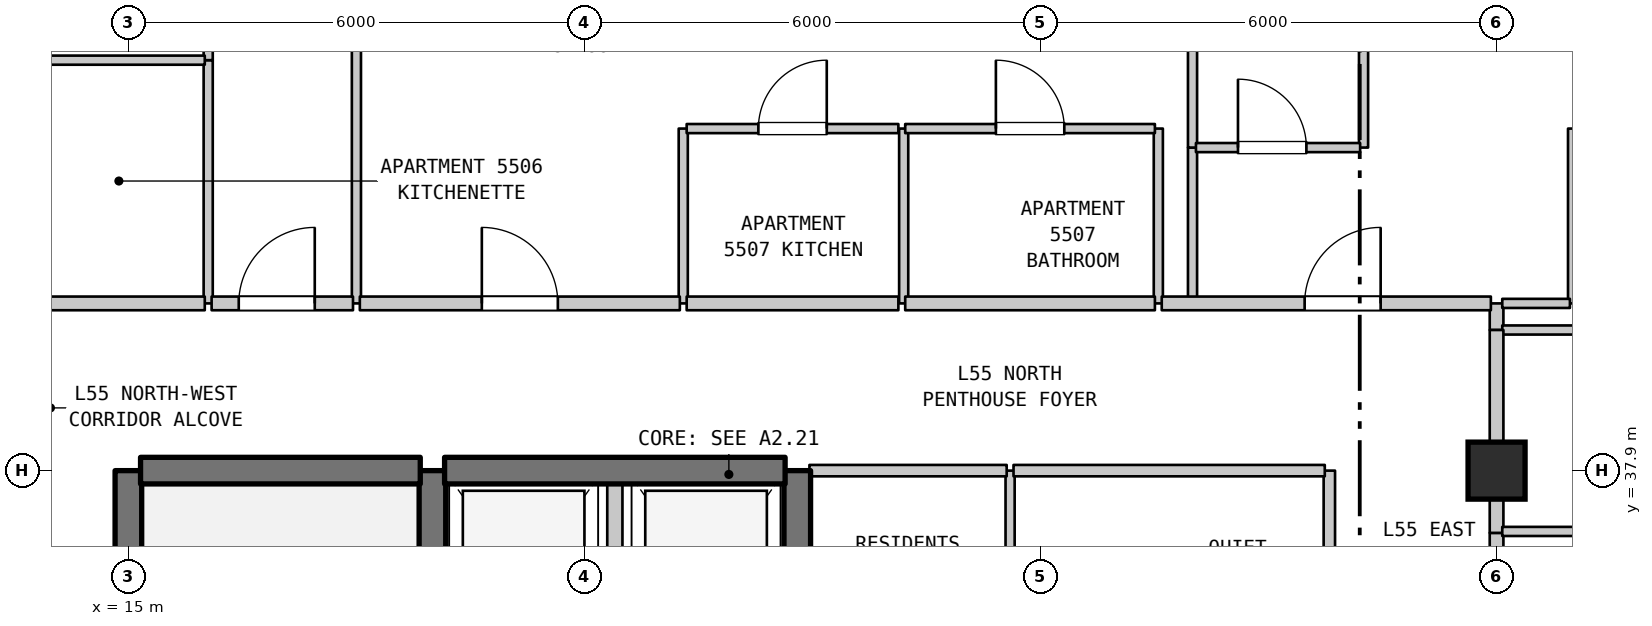
"""IFC4 building model, lengths in metres.
Left out: names, types, materials, properties, quantities, classifications, styles, units other than length and angle.
Written with IfcOpenShell. Run it as: python <this file> out.ifc"""

import sys

from ifc_helpers import new_model, si_unit, direction, frame, frame_2d, origin, origin_2d, place, context, subcontext, project, spatial, rectangle, extrude, element, fill, save


model = new_model("IFC4")
c1 = context("Model", 3, precision=1e-05, world=origin(), true_north=direction((0.0, 1.0)))
c2 = subcontext(c1, "Body", "Model", "MODEL_VIEW")
j1 = project(units=[si_unit("LENGTHUNIT", "METRE"), si_unit("PLANEANGLEUNIT", "RADIAN")], contexts=[c1])
p1 = place(None, origin())
s1 = spatial("IfcSite", under=j1, at=p1, CompositionType="ELEMENT")
p2 = place(p1, origin())
s2 = spatial("IfcBuilding", under=s1, at=p2, CompositionType="ELEMENT")
p3 = place(p2, frame((0.0, 0.0, 222.8)))
s3 = spatial("IfcBuildingStorey", under=s2, at=p3, CompositionType="ELEMENT", Elevation=222.8)
p4 = place(p3, frame((33.0, 37.9, 0.0), z_axis=(0.0, 0.0, 1.0), x_axis=(1.0, 0.0, 0.0)))
e1 = element("IfcColumn", 1, at=p4, inside=s3, PredefinedType="COLUMN", context=c2, shape_type="SweptSolid", body=[
    extrude(rectangle(XDim=0.75, YDim=0.75, at=origin_2d()), origin(), (0.0, 0.0, 1.0), 3.7),
])
p5 = place(p3, frame((15.0, 31.1, 0.0), z_axis=(0.0, 0.0, 1.0), x_axis=(0.0, 1.0, 0.0)))
e2 = element("IfcWall", 2, at=p5, inside=s3, PredefinedType="SHEAR", context=c2, shape_type="SweptSolid", body=[
    extrude(rectangle(XDim=6.8, YDim=0.35, at=frame_2d((3.4, 0.0))), origin(), (0.0, 0.0, 1.0), 3.39),
])
p6 = place(p3, frame((16.05, 40.1, 0.0), z_axis=(0.0, 0.0, 1.0), x_axis=(0.0, 1.0, 0.0)))
e3 = element("IfcWall", 3, at=p6, inside=s3, PredefinedType="PARTITIONING", context=c2, shape_type="SweptSolid", body=[
    extrude(rectangle(XDim=3.2, YDim=0.12, at=frame_2d((1.6, 0.0))), origin(), (0.0, 0.0, 1.0), 3.39),
])
p7 = place(p3, frame((16.05, 43.3, 0.0), z_axis=(0.0, 0.0, 1.0), x_axis=(0.0, 1.0, 0.0)))
e4 = element("IfcWall", 4, at=p7, inside=s3, PredefinedType="PARTITIONING", context=c2, shape_type="SweptSolid", body=[
    extrude(rectangle(XDim=2.9, YDim=0.12, at=frame_2d((1.45, 0.0))), origin(), (0.0, 0.0, 1.0), 3.39),
])
p8 = place(p3, frame((18.0, 40.1, 0.0), z_axis=(0.0, 0.0, 1.0), x_axis=(0.0, 1.0, 0.0)))
e5 = element("IfcWall", 5, at=p8, inside=s3, PredefinedType="PARTITIONING", context=c2, shape_type="SweptSolid", body=[
    extrude(rectangle(XDim=13.79, YDim=0.12, at=frame_2d((6.895, 0.0))), origin(), (0.0, 0.0, 1.0), 3.39),
])
p9 = place(p3, frame((19.0, 35.0, 0.0), z_axis=(0.0, 0.0, 1.0), x_axis=(0.0, 1.0, 0.0)))
e6 = element("IfcWall", 6, at=p9, inside=s3, PredefinedType="SHEAR", context=c2, shape_type="SweptSolid", body=[
    extrude(rectangle(XDim=2.9, YDim=0.35, at=frame_2d((1.45, 0.0))), origin(), (0.0, 0.0, 1.0), 3.39),
])
p10 = place(p3, frame((21.4, 35.0, 0.0), z_axis=(0.0, 0.0, 1.0), x_axis=(0.0, 1.0, 0.0)))
e7 = element("IfcWall", 7, at=p10, inside=s3, PredefinedType="STANDARD", context=c2, shape_type="SweptSolid", body=[
    extrude(rectangle(XDim=2.9, YDim=0.2, at=frame_2d((1.45, 0.0))), origin(), (0.0, 0.0, 1.0), 3.39),
])
p11 = place(p3, frame((22.3, 40.1, 0.0), z_axis=(0.0, 0.0, 1.0), x_axis=(0.0, 1.0, 0.0)))
e8 = element("IfcWall", 8, at=p11, inside=s3, PredefinedType="PARTITIONING", context=c2, shape_type="SweptSolid", body=[
    extrude(rectangle(XDim=2.3, YDim=0.12, at=frame_2d((1.15, 0.0))), origin(), (0.0, 0.0, 1.0), 3.39),
])
p12 = place(p3, frame((23.8, 35.0, 0.0), z_axis=(0.0, 0.0, 1.0), x_axis=(0.0, 1.0, 0.0)))
e9 = element("IfcWall", 9, at=p12, inside=s3, PredefinedType="SHEAR", context=c2, shape_type="SweptSolid", body=[
    extrude(rectangle(XDim=2.9, YDim=0.35, at=frame_2d((1.45, 0.0))), origin(), (0.0, 0.0, 1.0), 3.39),
])
p13 = place(p3, frame((25.2, 40.1, 0.0), z_axis=(0.0, 0.0, 1.0), x_axis=(0.0, 1.0, 0.0)))
e10 = element("IfcWall", 10, at=p13, inside=s3, PredefinedType="PARTITIONING", context=c2, shape_type="SweptSolid", body=[
    extrude(rectangle(XDim=2.3, YDim=0.12, at=frame_2d((1.15, 0.0))), origin(), (0.0, 0.0, 1.0), 3.39),
])
p14 = place(p3, frame((26.6, 35.0, 0.0), z_axis=(0.0, 0.0, 1.0), x_axis=(0.0, 1.0, 0.0)))
e11 = element("IfcWall", 11, at=p14, inside=s3, PredefinedType="PARTITIONING", context=c2, shape_type="SweptSolid", body=[
    extrude(rectangle(XDim=2.9, YDim=0.12, at=frame_2d((1.45, 0.0))), origin(), (0.0, 0.0, 1.0), 3.39),
])
p15 = place(p3, frame((28.55, 40.1, 0.0), z_axis=(0.0, 0.0, 1.0), x_axis=(0.0, 1.0, 0.0)))
e12 = element("IfcWall", 12, at=p15, inside=s3, PredefinedType="PARTITIONING", context=c2, shape_type="SweptSolid", body=[
    extrude(rectangle(XDim=2.3, YDim=0.12, at=frame_2d((1.15, 0.0))), origin(), (0.0, 0.0, 1.0), 3.39),
])
p16 = place(p3, frame((29.0, 40.1, 0.0), z_axis=(0.0, 0.0, 1.0), x_axis=(0.0, 1.0, 0.0)))
e13 = element("IfcWall", 13, at=p16, inside=s3, PredefinedType="PARTITIONING", context=c2, shape_type="SweptSolid", body=[
    extrude(rectangle(XDim=2.05, YDim=0.12, at=frame_2d((1.025, 0.0))), origin(), (0.0, 0.0, 1.0), 3.39),
])
p17 = place(p3, frame((29.0, 42.15, 0.0), z_axis=(0.0, 0.0, 1.0), x_axis=(0.0, 1.0, 0.0)))
e14 = element("IfcWall", 14, at=p17, inside=s3, PredefinedType="PARTITIONING", context=c2, shape_type="SweptSolid", body=[
    extrude(rectangle(XDim=3.3, YDim=0.12, at=frame_2d((1.65, 0.0))), origin(), (0.0, 0.0, 1.0), 3.39),
])
p18 = place(p3, frame((30.8, 35.0, 0.0), z_axis=(0.0, 0.0, 1.0), x_axis=(0.0, 1.0, 0.0)))
e15 = element("IfcWall", 15, at=p18, inside=s3, PredefinedType="STANDARD", context=c2, shape_type="SweptSolid", body=[
    extrude(rectangle(XDim=2.9, YDim=0.15, at=frame_2d((1.45, 0.0))), origin(), (0.0, 0.0, 1.0), 3.39),
])
p19 = place(p3, frame((31.25, 42.15, 0.0), z_axis=(0.0, 0.0, 1.0), x_axis=(0.0, 1.0, 0.0)))
e16 = element("IfcWall", 16, at=p19, inside=s3, PredefinedType="PARTITIONING", context=c2, shape_type="SweptSolid", body=[
    extrude(rectangle(XDim=11.74, YDim=0.12, at=frame_2d((5.87, 0.0))), origin(), (0.0, 0.0, 1.0), 3.39),
])
p20 = place(p3, frame((33.0, 34.883, 0.0), z_axis=(0.0, 0.0, 1.0), x_axis=(0.0, 1.0, 0.0)))
e17 = element("IfcWall", 17, at=p20, inside=s3, PredefinedType="STANDARD", context=c2, shape_type="SweptSolid", body=[
    extrude(rectangle(XDim=2.198, YDim=0.18, at=frame_2d((1.099, 0.0))), origin(), (0.0, 0.0, 1.0), 2.89),
])
p21 = place(p3, frame((33.0, 37.081, 0.0), z_axis=(0.0, 0.0, 1.0), x_axis=(0.0, 1.0, 0.0)))
e18 = element("IfcWall", 18, at=p21, inside=s3, PredefinedType="STANDARD", context=c2, shape_type="SweptSolid", body=[
    extrude(rectangle(XDim=0.819, YDim=0.18, at=frame_2d((0.409, 0.0))), origin(), (0.0, 0.0, 1.0), 2.89),
])
p22 = place(p3, frame((33.0, 39.75, 0.0), z_axis=(0.0, 0.0, 1.0), x_axis=(0.0, 1.0, 0.0)))
e19 = element("IfcWall", 19, at=p22, inside=s3, PredefinedType="STANDARD", context=c2, shape_type="SweptSolid", body=[
    extrude(rectangle(XDim=0.35, YDim=0.18, at=frame_2d((0.175, 0.0))), origin(), (0.0, 0.0, 1.0), 3.39),
])
p23 = place(p3, frame((34.0, 40.1, 0.0), z_axis=(0.0, 0.0, 1.0), x_axis=(0.0, 1.0, 0.0)))
e20 = element("IfcWall", 20, at=p23, inside=s3, PredefinedType="PARTITIONING", context=c2, shape_type="SweptSolid", body=[
    extrude(rectangle(XDim=2.3, YDim=0.12, at=frame_2d((1.15, 0.0))), origin(), (0.0, 0.0, 1.0), 3.39),
])
p24 = place(p3, frame((33.075, 37.1, 0.0), z_axis=(0.0, 0.0, 1.0), x_axis=(1.0, 0.0, 0.0)))
e21 = element("IfcWall", 21, at=p24, inside=s3, PredefinedType="PARTITIONING", context=c2, shape_type="SweptSolid", body=[
    extrude(rectangle(XDim=4.46, YDim=0.12, at=frame_2d((2.23, 0.0))), origin(), (0.0, 0.0, 1.0), 3.39),
])
p25 = place(p3, frame((15.16, 37.9, 0.0), z_axis=(0.0, 0.0, 1.0), x_axis=(1.0, 0.0, 0.0)))
e22 = element("IfcWall", 22, at=p25, inside=s3, PredefinedType="SHEAR", context=c2, shape_type="SweptSolid", body=[
    extrude(rectangle(XDim=3.68, YDim=0.35, at=frame_2d((1.84, 0.0))), origin(), (0.0, 0.0, 1.0), 3.39),
])
p26 = place(p3, frame((19.16, 37.9, 0.0), z_axis=(0.0, 0.0, 1.0), x_axis=(1.0, 0.0, 0.0)))
e23 = element("IfcWall", 23, at=p26, inside=s3, PredefinedType="SHEAR", context=c2, shape_type="SweptSolid", body=[
    extrude(rectangle(XDim=4.48, YDim=0.35, at=frame_2d((2.24, 0.0))), origin(), (0.0, 0.0, 1.0), 3.39),
])
p27 = place(p3, frame((23.96, 37.9, 0.0), z_axis=(0.0, 0.0, 1.0), x_axis=(1.0, 0.0, 0.0)))
e24 = element("IfcWall", 24, at=p27, inside=s3, PredefinedType="STANDARD", context=c2, shape_type="SweptSolid", body=[
    extrude(rectangle(XDim=2.595, YDim=0.15, at=frame_2d((1.297, 0.0))), origin(), (0.0, 0.0, 1.0), 2.89),
])
p28 = place(p3, frame((26.645, 37.9, 0.0), z_axis=(0.0, 0.0, 1.0), x_axis=(1.0, 0.0, 0.0)))
e25 = element("IfcWall", 25, at=p28, inside=s3, PredefinedType="STANDARD", context=c2, shape_type="SweptSolid", body=[
    extrude(rectangle(XDim=4.095, YDim=0.15, at=frame_2d((2.047, 0.0))), origin(), (0.0, 0.0, 1.0), 2.89),
])
p29 = place(p3, frame((33.075, 39.75, 0.0), z_axis=(0.0, 0.0, 1.0), x_axis=(1.0, 0.0, 0.0)))
e26 = element("IfcWall", 26, at=p29, inside=s3, PredefinedType="PARTITIONING", context=c2, shape_type="SweptSolid", body=[
    extrude(rectangle(XDim=4.46, YDim=0.12, at=frame_2d((2.23, 0.0))), origin(), (0.0, 0.0, 1.0), 3.39),
])
p30 = place(p3, frame((13.745, 40.1, 0.0), z_axis=(0.0, 0.0, 1.0), x_axis=(1.0, 0.0, 0.0)))
e27 = element("IfcWall", 27, at=p30, inside=s3, PredefinedType="STANDARD", context=c2, shape_type="SweptSolid", body=[
    extrude(rectangle(XDim=2.26, YDim=0.18, at=frame_2d((1.13, 0.0))), origin(), (0.0, 0.0, 1.0), 3.39),
])
p31 = place(p3, frame((16.095, 40.1, 0.0), z_axis=(0.0, 0.0, 1.0), x_axis=(1.0, 0.0, 0.0)))
e28 = element("IfcWall", 28, at=p31, inside=s3, PredefinedType="STANDARD", context=c2, shape_type="SweptSolid", body=[
    extrude(rectangle(XDim=1.86, YDim=0.18, at=frame_2d((0.93, 0.0))), origin(), (0.0, 0.0, 1.0), 3.39),
])
p32 = place(p31, frame((0.357, 0.0, 0.0)))
e29 = element("IfcOpeningElement", 29, at=p32, cuts=e28, PredefinedType="OPENING", context=c2, shape_type="SweptSolid", body=[
    extrude(rectangle(XDim=1.0, YDim=2.15, at=frame_2d((0.5, 1.075))), frame((0.0, 0.1, 0.0), z_axis=(0.0, -1.0, 0.0), x_axis=(1.0, 0.0, 0.0)), (0.0, 0.0, 1.0), 0.2),
])
p33 = place(p3, frame((18.045, 40.1, 0.0), z_axis=(0.0, 0.0, 1.0), x_axis=(1.0, 0.0, 0.0)))
e30 = element("IfcWall", 30, at=p33, inside=s3, PredefinedType="STANDARD", context=c2, shape_type="SweptSolid", body=[
    extrude(rectangle(XDim=4.21, YDim=0.18, at=frame_2d((2.105, 0.0))), origin(), (0.0, 0.0, 1.0), 3.39),
])
p34 = place(p33, frame((1.605, 0.0, 0.0)))
e31 = element("IfcOpeningElement", 31, at=p34, cuts=e30, PredefinedType="OPENING", context=c2, shape_type="SweptSolid", body=[
    extrude(rectangle(XDim=1.0, YDim=2.15, at=frame_2d((0.5, 1.075))), frame((0.0, 0.1, 0.0), z_axis=(0.0, -1.0, 0.0), x_axis=(1.0, 0.0, 0.0)), (0.0, 0.0, 1.0), 0.2),
])
p35 = place(p3, frame((22.345, 40.1, 0.0), z_axis=(0.0, 0.0, 1.0), x_axis=(1.0, 0.0, 0.0)))
e32 = element("IfcWall", 32, at=p35, inside=s3, PredefinedType="STANDARD", context=c2, shape_type="SweptSolid", body=[
    extrude(rectangle(XDim=2.785, YDim=0.18, at=frame_2d((1.393, 0.0))), origin(), (0.0, 0.0, 1.0), 3.39),
])
p36 = place(p3, frame((25.22, 40.1, 0.0), z_axis=(0.0, 0.0, 1.0), x_axis=(1.0, 0.0, 0.0)))
e33 = element("IfcWall", 33, at=p36, inside=s3, PredefinedType="STANDARD", context=c2, shape_type="SweptSolid", body=[
    extrude(rectangle(XDim=3.285, YDim=0.18, at=frame_2d((1.643, 0.0))), origin(), (0.0, 0.0, 1.0), 3.39),
])
p37 = place(p3, frame((28.595, 40.1, 0.0), z_axis=(0.0, 0.0, 1.0), x_axis=(1.0, 0.0, 0.0)))
e34 = element("IfcWall", 34, at=p37, inside=s3, PredefinedType="STANDARD", context=c2, shape_type="SweptSolid", body=[
    extrude(rectangle(XDim=4.33, YDim=0.18, at=frame_2d((2.165, 0.0))), origin(), (0.0, 0.0, 1.0), 3.39),
])
p38 = place(p37, frame((1.88, 0.0, 0.0)))
e35 = element("IfcOpeningElement", 35, at=p38, cuts=e34, PredefinedType="OPENING", context=c2, shape_type="SweptSolid", body=[
    extrude(rectangle(XDim=1.0, YDim=2.15, at=frame_2d((0.5, 1.075))), frame((0.0, 0.1, 0.0), z_axis=(0.0, -1.0, 0.0), x_axis=(1.0, 0.0, 0.0)), (0.0, 0.0, 1.0), 0.2),
])
p39 = place(p3, frame((33.075, 40.1, 0.0), z_axis=(0.0, 0.0, 1.0), x_axis=(1.0, 0.0, 0.0)))
e36 = element("IfcWall", 36, at=p39, inside=s3, PredefinedType="PARTITIONING", context=c2, shape_type="SweptSolid", body=[
    extrude(rectangle(XDim=0.89, YDim=0.12, at=frame_2d((0.445, 0.0))), origin(), (0.0, 0.0, 1.0), 3.39),
])
p40 = place(p3, frame((29.045, 42.15, 0.0), z_axis=(0.0, 0.0, 1.0), x_axis=(1.0, 0.0, 0.0)))
e37 = element("IfcWall", 37, at=p40, inside=s3, PredefinedType="PARTITIONING", context=c2, shape_type="SweptSolid", body=[
    extrude(rectangle(XDim=2.16, YDim=0.12, at=frame_2d((1.08, 0.0))), origin(), (0.0, 0.0, 1.0), 3.39),
])
p41 = place(p40, frame((0.553, 0.0, 0.0)))
e38 = element("IfcOpeningElement", 38, at=p41, cuts=e37, PredefinedType="OPENING", context=c2, shape_type="SweptSolid", body=[
    extrude(rectangle(XDim=0.9, YDim=2.15, at=frame_2d((0.45, 1.075))), frame((0.0, 0.07, 0.0), z_axis=(0.0, -1.0, 0.0), x_axis=(1.0, 0.0, 0.0)), (0.0, 0.0, 1.0), 0.14),
])
p42 = place(p3, frame((22.345, 42.4, 0.0), z_axis=(0.0, 0.0, 1.0), x_axis=(1.0, 0.0, 0.0)))
e39 = element("IfcWall", 39, at=p42, inside=s3, PredefinedType="PARTITIONING", context=c2, shape_type="SweptSolid", body=[
    extrude(rectangle(XDim=2.785, YDim=0.12, at=frame_2d((1.393, 0.0))), origin(), (0.0, 0.0, 1.0), 3.39),
])
p43 = place(p42, frame((0.943, 0.0, 0.0)))
e40 = element("IfcOpeningElement", 40, at=p43, cuts=e39, PredefinedType="OPENING", context=c2, shape_type="SweptSolid", body=[
    extrude(rectangle(XDim=0.9, YDim=2.15, at=frame_2d((0.45, 1.075))), frame((0.0, 0.07, 0.0), z_axis=(0.0, -1.0, 0.0), x_axis=(1.0, 0.0, 0.0)), (0.0, 0.0, 1.0), 0.14),
])
p44 = place(p3, frame((25.22, 42.4, 0.0), z_axis=(0.0, 0.0, 1.0), x_axis=(1.0, 0.0, 0.0)))
e41 = element("IfcWall", 41, at=p44, inside=s3, PredefinedType="PARTITIONING", context=c2, shape_type="SweptSolid", body=[
    extrude(rectangle(XDim=3.285, YDim=0.12, at=frame_2d((1.643, 0.0))), origin(), (0.0, 0.0, 1.0), 3.39),
])
p45 = place(p44, frame((1.193, 0.0, 0.0)))
e42 = element("IfcOpeningElement", 42, at=p45, cuts=e41, PredefinedType="OPENING", context=c2, shape_type="SweptSolid", body=[
    extrude(rectangle(XDim=0.9, YDim=2.1, at=frame_2d((0.45, 1.05))), frame((0.0, 0.07, 0.0), z_axis=(0.0, -1.0, 0.0), x_axis=(1.0, 0.0, 0.0)), (0.0, 0.0, 1.0), 0.14),
])
p46 = place(p3, frame((13.745, 43.3, 0.0), z_axis=(0.0, 0.0, 1.0), x_axis=(1.0, 0.0, 0.0)))
e43 = element("IfcWall", 43, at=p46, inside=s3, PredefinedType="PARTITIONING", context=c2, shape_type="SweptSolid", body=[
    extrude(rectangle(XDim=2.26, YDim=0.12, at=frame_2d((1.13, 0.0))), origin(), (0.0, 0.0, 1.0), 3.39),
])
p47 = place(p3, frame((33.0, 37.9, 0.0), z_axis=(0.0, 0.0, 1.0), x_axis=(0.0, 1.0, 0.0)))
e44 = element("IfcWall", 44, at=p47, inside=s3, PredefinedType="STANDARD", context=c2, shape_type="SweptSolid", body=[
    extrude(rectangle(XDim=1.85, YDim=0.18, at=frame_2d((0.925, 0.0))), origin(), (0.0, 0.0, 1.0), 2.79),
])
p48 = place(p32, origin())
e45 = element("IfcDoor", 45, at=p48, inside=s3, OperationType="SINGLE_SWING_RIGHT", PredefinedType="DOOR", context=c2, shape_type="SweptSolid", body=[
    extrude(rectangle(XDim=1.0, YDim=2.15, at=frame_2d((0.5, 1.075))), frame((0.0, 0.025, 0.0), z_axis=(0.0, -1.0, 0.0), x_axis=(1.0, 0.0, 0.0)), (0.0, 0.0, 1.0), 0.05),
])
fill(e29, e45)
p49 = place(p34, origin())
e46 = element("IfcDoor", 46, at=p49, inside=s3, OperationType="SINGLE_SWING_LEFT", PredefinedType="DOOR", context=c2, shape_type="SweptSolid", body=[
    extrude(rectangle(XDim=1.0, YDim=2.15, at=frame_2d((0.5, 1.075))), frame((0.0, 0.025, 0.0), z_axis=(0.0, -1.0, 0.0), x_axis=(1.0, 0.0, 0.0)), (0.0, 0.0, 1.0), 0.05),
])
fill(e31, e46)
p50 = place(p38, origin())
e47 = element("IfcDoor", 47, at=p50, inside=s3, OperationType="SINGLE_SWING_RIGHT", PredefinedType="DOOR", context=c2, shape_type="SweptSolid", body=[
    extrude(rectangle(XDim=1.0, YDim=2.15, at=frame_2d((0.5, 1.075))), frame((0.0, 0.025, 0.0), z_axis=(0.0, -1.0, 0.0), x_axis=(1.0, 0.0, 0.0)), (0.0, 0.0, 1.0), 0.05),
])
fill(e35, e47)
p51 = place(p41, origin())
e48 = element("IfcDoor", 48, at=p51, inside=s3, OperationType="SINGLE_SWING_LEFT", PredefinedType="DOOR", context=c2, shape_type="SweptSolid", body=[
    extrude(rectangle(XDim=0.9, YDim=2.15, at=frame_2d((0.45, 1.075))), frame((0.0, 0.025, 0.0), z_axis=(0.0, -1.0, 0.0), x_axis=(1.0, 0.0, 0.0)), (0.0, 0.0, 1.0), 0.05),
])
fill(e38, e48)
p52 = place(p43, origin())
e49 = element("IfcDoor", 49, at=p52, inside=s3, OperationType="SINGLE_SWING_RIGHT", PredefinedType="DOOR", context=c2, shape_type="SweptSolid", body=[
    extrude(rectangle(XDim=0.9, YDim=2.15, at=frame_2d((0.45, 1.075))), frame((0.0, 0.025, 0.0), z_axis=(0.0, -1.0, 0.0), x_axis=(1.0, 0.0, 0.0)), (0.0, 0.0, 1.0), 0.05),
])
fill(e40, e49)
p53 = place(p45, origin())
e50 = element("IfcDoor", 50, at=p53, inside=s3, OperationType="SINGLE_SWING_LEFT", PredefinedType="DOOR", context=c2, shape_type="SweptSolid", body=[
    extrude(rectangle(XDim=0.9, YDim=2.1, at=frame_2d((0.45, 1.05))), frame((0.0, 0.025, 0.0), z_axis=(0.0, -1.0, 0.0), x_axis=(1.0, 0.0, 0.0)), (0.0, 0.0, 1.0), 0.05),
])
fill(e42, e50)
save(model, sys.argv[1])
